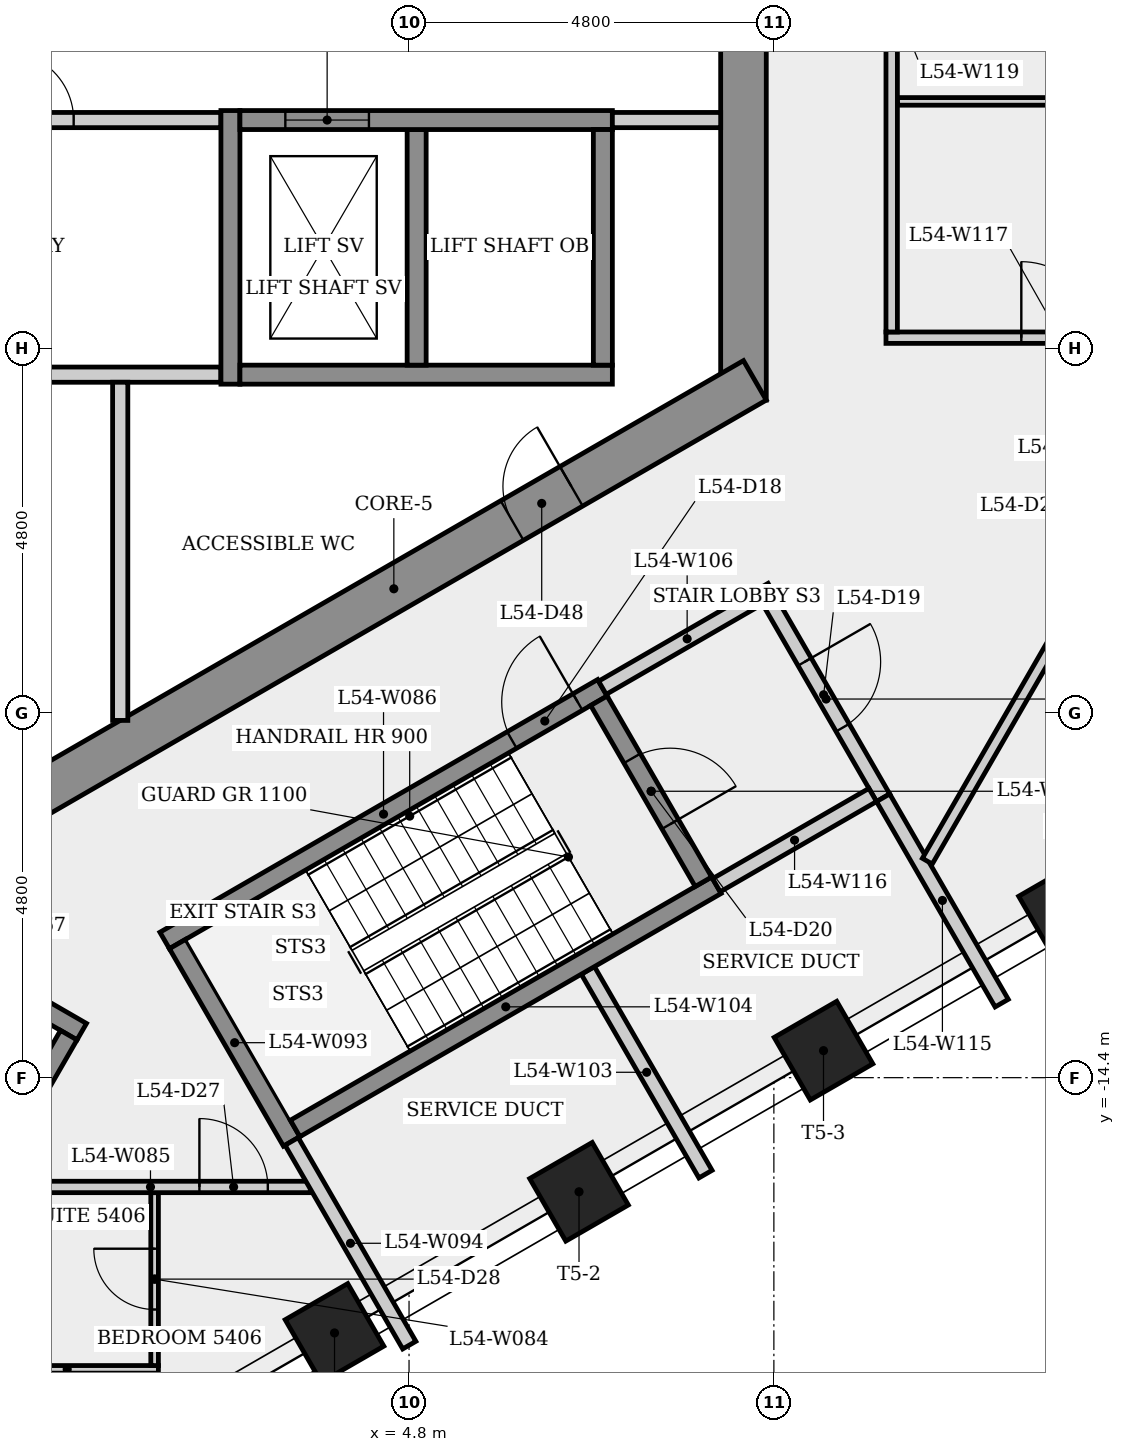
"""IFC4 building model, lengths in metres.
Left out: names, types, materials, properties, quantities, classifications, styles, units other than length and angle.
Written with IfcOpenShell. Run it as: python <this file> out.ifc"""

import sys

from ifc_helpers import new_model, si_unit, direction, frame, frame_2d, origin, origin_2d, place, context, subcontext, project, spatial, rectangle, extrude, element, fill, save


model = new_model("IFC4")
c1 = context("Model", 3, precision=1e-05, world=origin(), true_north=direction((0.0, 1.0)))
c2 = subcontext(c1, "Body", "Model", "MODEL_VIEW")
j1 = project(units=[si_unit("LENGTHUNIT", "METRE"), si_unit("PLANEANGLEUNIT", "RADIAN")], contexts=[c1])
p1 = place(None, origin())
s1 = spatial("IfcSite", under=j1, at=p1, CompositionType="ELEMENT")
p2 = place(p1, origin())
s2 = spatial("IfcBuilding", under=s1, at=p2, CompositionType="ELEMENT")
p3 = place(p2, frame((0.0, 0.0, 202.1)))
s3 = spatial("IfcBuildingStorey", under=s2, at=p3, CompositionType="ELEMENT", Elevation=202.1)
p4 = place(p3, frame((9.2, -5.485, 0.0), z_axis=(0.0, 0.0, 1.0), x_axis=(0.0, 1.0, 0.0)))
e1 = element("IfcWall", 1, at=p4, inside=s3, PredefinedType="SHEAR", context=c2, shape_type="SweptSolid", body=[
    extrude(rectangle(XDim=10.97, YDim=0.6, at=frame_2d((5.485, 0.0))), origin(), (0.0, 0.0, 1.0), 4.0),
])
p5 = place(p4, frame((4.685, 0.0, 0.0)))
e2 = element("IfcOpeningElement", 2, at=p5, cuts=e1, PredefinedType="OPENING", context=c2, shape_type="SweptSolid", body=[
    extrude(rectangle(XDim=1.6, YDim=2.1, at=frame_2d((0.8, 1.05))), frame((0.0, 0.31, 0.0), z_axis=(0.0, -1.0, 0.0), x_axis=(1.0, 0.0, 0.0)), (0.0, 0.0, 1.0), 0.62),
])
p6 = place(p3, frame((-9.35, -5.225, 0.0), z_axis=(0.0, 0.0, 1.0), x_axis=(0.866023993627, -0.500002442456, 0.0)))
e3 = element("IfcWall", 3, at=p6, inside=s3, PredefinedType="SHEAR", context=c2, shape_type="SweptSolid", body=[
    extrude(rectangle(XDim=10.97, YDim=0.6, at=frame_2d((5.485, 0.0))), origin(), (0.0, 0.0, 1.0), 4.0),
])
p7 = place(p6, frame((5.045, 0.0, 0.0)))
e4 = element("IfcOpeningElement", 4, at=p7, cuts=e3, PredefinedType="OPENING", context=c2, shape_type="SweptSolid", body=[
    extrude(rectangle(XDim=0.9, YDim=2.1, at=frame_2d((0.45, 1.05))), frame((0.0, 0.31, 0.0), z_axis=(0.0, -1.0, 0.0), x_axis=(1.0, 0.0, 0.0)), (0.0, 0.0, 1.0), 0.62),
])
p8 = place(p3, frame((-0.15, -10.71, 0.0), z_axis=(0.0, 0.0, 1.0), x_axis=(0.866023993627, 0.500002442456, 0.0)))
e5 = element("IfcWall", 5, at=p8, inside=s3, PredefinedType="SHEAR", context=c2, shape_type="SweptSolid", body=[
    extrude(rectangle(XDim=10.97, YDim=0.6, at=frame_2d((5.485, 0.0))), origin(), (0.0, 0.0, 1.0), 4.0),
])
p9 = place(p8, frame((7.281, 0.0, 0.0)))
e6 = element("IfcOpeningElement", 6, at=p9, cuts=e5, PredefinedType="OPENING", context=c2, shape_type="SweptSolid", body=[
    extrude(rectangle(XDim=0.9, YDim=2.1, at=frame_2d((0.45, 1.05))), frame((0.0, 0.31, 0.0), z_axis=(0.0, -1.0, 0.0), x_axis=(1.0, 0.0, 0.0)), (0.0, 0.0, 1.0), 0.62),
])
for number, where, z_axis, x_axis in (
    (7, (3.82, -17.759, 0.0), (0.0, 0.0, 1.0), (0.5, -0.866, 0.0)),
    (8, (7.036, -15.902, 0.0), (0.0, 0.0, 1.0), (0.5, -0.866, 0.0)),
    (9, (10.253, -14.044, 0.0), (0.0, 0.0, 1.0), (0.5, -0.866, 0.0)),
    (10, (13.47, -12.187, 0.0), (0.0, 0.0, 1.0), (0.5, -0.866, 0.0)),
):
    element("IfcColumn", number, at=place(p3, frame(where, z_axis=z_axis, x_axis=x_axis)), inside=s3, PredefinedType="COLUMN", context=c2, shape_type="SweptSolid", body=[
        extrude(rectangle(XDim=0.95, YDim=0.95, at=origin_2d()), origin(), (0.0, 0.0, 1.0), 4.0),
    ])
p10 = place(p3, frame((-8.88, -5.15, 0.0), z_axis=(0.0, 0.0, 1.0), x_axis=(1.0, 0.0, 0.0)))
e11 = element("IfcWall", 11, at=p10, inside=s3, PredefinedType="PARTITIONING", context=c2, shape_type="SweptSolid", body=[
    extrude(rectangle(XDim=11.205, YDim=0.2, at=frame_2d((5.603, 0.0))), origin(), (0.0, 0.0, 1.0), 3.6),
])
p11 = place(p3, frame((-8.9, -1.8, 0.0), z_axis=(0.0, 0.0, 1.0), x_axis=(1.0, 0.0, 0.0)))
e12 = element("IfcWall", 12, at=p11, inside=s3, PredefinedType="PARTITIONING", context=c2, shape_type="SweptSolid", body=[
    extrude(rectangle(XDim=11.225, YDim=0.2, at=frame_2d((5.613, 0.0))), origin(), (0.0, 0.0, 1.0), 3.6),
])
p12 = place(p11, frame((2.485, 0.0, 0.0)))
e13 = element("IfcOpeningElement", 13, at=p12, cuts=e12, PredefinedType="OPENING", context=c2, shape_type="SweptSolid", body=[
    extrude(rectangle(XDim=0.9, YDim=2.1, at=frame_2d((0.45, 1.05))), frame((0.0, 0.11, 0.0), z_axis=(0.0, -1.0, 0.0), x_axis=(1.0, 0.0, 0.0)), (0.0, 0.0, 1.0), 0.22),
])
p13 = place(p11, frame((8.387, 0.0, 0.0)))
e14 = element("IfcOpeningElement", 14, at=p13, cuts=e12, PredefinedType="OPENING", context=c2, shape_type="SweptSolid", body=[
    extrude(rectangle(XDim=0.9, YDim=2.1, at=frame_2d((0.45, 1.05))), frame((0.0, 0.11, 0.0), z_axis=(0.0, -1.0, 0.0), x_axis=(1.0, 0.0, 0.0)), (0.0, 0.0, 1.0), 0.22),
])
p14 = place(p3, frame((-2.364, -12.145, 0.0), z_axis=(0.0, 0.0, 1.0), x_axis=(0.866040211805, -0.499974350878, 0.0)))
e15 = element("IfcWall", 15, at=p14, inside=s3, PredefinedType="SHEAR", context=c2, shape_type="SweptSolid", body=[
    extrude(rectangle(XDim=3.3, YDim=0.25, at=frame_2d((1.65, 0.0))), origin(), (0.0, 0.0, 1.0), 3.6),
])
p15 = place(p3, frame((-0.898, -18.238, 0.0), z_axis=(0.0, 0.0, 1.0), x_axis=(1.0, 0.0, 0.0)))
e16 = element("IfcWall", 16, at=p15, inside=s3, PredefinedType="PARTITIONING", context=c2, shape_type="SweptSolid", body=[
    extrude(rectangle(XDim=2.4, YDim=0.1, at=frame_2d((1.2, 0.0))), origin(), (0.0, 0.0, 1.0), 3.6),
])
p16 = place(p3, frame((0.323, -13.841, 0.0), z_axis=(0.0, 0.0, 1.0), x_axis=(-0.500086702647, -0.865975340201, 0.0)))
e17 = element("IfcWall", 17, at=p16, inside=s3, PredefinedType="SHEAR", context=c2, shape_type="SweptSolid", body=[
    extrude(rectangle(XDim=2.301, YDim=0.25, at=frame_2d((1.151, 0.0))), origin(), (0.0, 0.0, 1.0), 4.0),
])
p17 = place(p3, frame((1.0, -5.25, 0.0), z_axis=(0.0, 0.0, 1.0), x_axis=(0.0, -1.0, 0.0)))
e18 = element("IfcWall", 18, at=p17, inside=s3, PredefinedType="PARTITIONING", context=c2, shape_type="SweptSolid", body=[
    extrude(rectangle(XDim=4.449, YDim=0.2, at=frame_2d((2.225, 0.0))), origin(), (0.0, 0.0, 1.0), 3.6),
])
p18 = place(p3, frame((1.452, -18.188, 0.0), z_axis=(0.0, 0.0, 1.0), x_axis=(0.0, 1.0, 0.0)))
e19 = element("IfcWall", 19, at=p18, inside=s3, PredefinedType="PARTITIONING", context=c2, shape_type="SweptSolid", body=[
    extrude(rectangle(XDim=2.275, YDim=0.1, at=frame_2d((1.137, 0.0))), origin(), (0.0, 0.0, 1.0), 3.6),
])
p19 = place(p18, frame((0.738, 0.0, 0.0)))
e20 = element("IfcOpeningElement", 20, at=p19, cuts=e19, PredefinedType="OPENING", context=c2, shape_type="SweptSolid", body=[
    extrude(rectangle(XDim=0.8, YDim=2.1, at=frame_2d((0.4, 1.05))), frame((0.0, 0.06, 0.0), z_axis=(0.0, -1.0, 0.0), x_axis=(1.0, 0.0, 0.0)), (0.0, 0.0, 1.0), 0.12),
])
p20 = place(p3, frame((-0.705, -15.838, 0.0), z_axis=(0.0, 0.0, 1.0), x_axis=(1.0, 0.0, 0.0)))
e21 = element("IfcWall", 21, at=p20, inside=s3, PredefinedType="PARTITIONING", context=c2, shape_type="SweptSolid", body=[
    extrude(rectangle(XDim=4.207, YDim=0.15, at=frame_2d((2.104, 0.0))), origin(), (0.0, 0.0, 1.0), 3.6),
])
p21 = place(p20, frame((2.747, 0.0, 0.0)))
e22 = element("IfcOpeningElement", 22, at=p21, cuts=e21, PredefinedType="OPENING", context=c2, shape_type="SweptSolid", body=[
    extrude(rectangle(XDim=0.9, YDim=2.1, at=frame_2d((0.45, 1.05))), frame((0.0, 0.085, 0.0), z_axis=(0.0, -1.0, 0.0), x_axis=(1.0, 0.0, 0.0)), (0.0, 0.0, 1.0), 0.17),
])
p22 = place(p3, frame((1.585, -12.595, 0.0), z_axis=(0.0, 0.0, 1.0), x_axis=(0.866036417653, 0.499980922934, 0.0)))
e23 = element("IfcWall", 23, at=p22, inside=s3, PredefinedType="SHEAR", context=c2, shape_type="SweptSolid", body=[
    extrude(rectangle(XDim=6.65, YDim=0.25, at=frame_2d((3.325, 0.0))), origin(), (0.0, 0.0, 1.0), 3.6),
])
p23 = place(p22, frame((5.275, 0.0, 0.0)))
e24 = element("IfcOpeningElement", 24, at=p23, cuts=e23, PredefinedType="OPENING", context=c2, shape_type="SweptSolid", body=[
    extrude(rectangle(XDim=1.0, YDim=2.1, at=frame_2d((0.5, 1.05))), frame((0.0, 0.135, 0.0), z_axis=(0.0, -1.0, 0.0), x_axis=(1.0, 0.0, 0.0)), (0.0, 0.0, 1.0), 0.27),
])
p24 = place(p3, frame((2.45, -5.275, 0.0), z_axis=(0.0, 0.0, 1.0), x_axis=(0.0, 1.0, 0.0)))
e25 = element("IfcWall", 25, at=p24, inside=s3, PredefinedType="SHEAR", context=c2, shape_type="SweptSolid", body=[
    extrude(rectangle(XDim=3.6, YDim=0.25, at=frame_2d((1.8, 0.0))), origin(), (0.0, 0.0, 1.0), 3.6),
])
p25 = place(p3, frame((3.256, -15.239, 0.0), z_axis=(0.0, 0.0, 1.0), x_axis=(-0.50002537861, 0.866010750942, 0.0)))
e26 = element("IfcWall", 26, at=p25, inside=s3, PredefinedType="SHEAR", context=c2, shape_type="SweptSolid", body=[
    extrude(rectangle(XDim=3.0, YDim=0.25, at=frame_2d((1.5, 0.0))), origin(), (0.0, 0.0, 1.0), 3.6),
])
p26 = place(p3, frame((3.256, -15.239, 0.0), z_axis=(0.0, 0.0, 1.0), x_axis=(0.499981900942, -0.866035853028, 0.0)))
e27 = element("IfcWall", 27, at=p26, inside=s3, PredefinedType="PLUMBINGWALL", context=c2, shape_type="SweptSolid", body=[
    extrude(rectangle(XDim=3.095, YDim=0.2, at=frame_2d((1.548, 0.0))), origin(), (0.0, 0.0, 1.0), 3.6),
])
p27 = place(p3, frame((2.575, -5.15, 0.0), z_axis=(0.0, 0.0, 1.0), x_axis=(1.0, 0.0, 0.0)))
e28 = element("IfcWall", 28, at=p27, inside=s3, PredefinedType="SHEAR", context=c2, shape_type="SweptSolid", body=[
    extrude(rectangle(XDim=4.9, YDim=0.25, at=frame_2d((2.45, 0.0))), origin(), (0.0, 0.0, 1.0), 3.6),
])
p28 = place(p3, frame((4.9, -1.925, 0.0), z_axis=(0.0, 0.0, 1.0), x_axis=(0.0, -1.0, 0.0)))
e29 = element("IfcWall", 29, at=p28, inside=s3, PredefinedType="SHEAR", context=c2, shape_type="SweptSolid", body=[
    extrude(rectangle(XDim=3.1, YDim=0.25, at=frame_2d((1.55, 0.0))), origin(), (0.0, 0.0, 1.0), 4.0),
])
p29 = place(p3, frame((2.575, -1.8, 0.0), z_axis=(0.0, 0.0, 1.0), x_axis=(1.0, 0.0, 0.0)))
e30 = element("IfcWall", 30, at=p29, inside=s3, PredefinedType="SHEAR", context=c2, shape_type="SweptSolid", body=[
    extrude(rectangle(XDim=4.9, YDim=0.25, at=frame_2d((2.45, 0.0))), origin(), (0.0, 0.0, 1.0), 3.6),
])
p30 = place(p29, frame((0.597, 0.0, 0.0)))
e31 = element("IfcOpeningElement", 31, at=p30, cuts=e30, PredefinedType="OPENING", context=c2, shape_type="SweptSolid", body=[
    extrude(rectangle(XDim=1.1, YDim=2.1, at=frame_2d((0.55, 1.05))), frame((0.0, 0.135, 0.0), z_axis=(0.0, -1.0, 0.0), x_axis=(1.0, 0.0, 0.0)), (0.0, 0.0, 1.0), 0.27),
])
p31 = place(p3, frame((7.153, -12.989, 0.0), z_axis=(0.0, 0.0, 1.0), x_axis=(0.499981900942, -0.866035853028, 0.0)))
e32 = element("IfcWall", 32, at=p31, inside=s3, PredefinedType="PLUMBINGWALL", context=c2, shape_type="SweptSolid", body=[
    extrude(rectangle(XDim=3.095, YDim=0.2, at=frame_2d((1.548, 0.0))), origin(), (0.0, 0.0, 1.0), 3.6),
])
p32 = place(p3, frame((3.301, -15.068, 0.0), z_axis=(0.0, 0.0, 1.0), x_axis=(0.866035036182, 0.499983315828, 0.0)))
e33 = element("IfcWall", 33, at=p32, inside=s3, PredefinedType="SHEAR", context=c2, shape_type="SweptSolid", body=[
    extrude(rectangle(XDim=6.4, YDim=0.25, at=frame_2d((3.2, 0.0))), origin(), (0.0, 0.0, 1.0), 4.0),
])
p33 = place(p3, frame((7.298, -9.441, 0.0), z_axis=(0.0, 0.0, 1.0), x_axis=(0.500034990121, -0.866005201286, 0.0)))
e34 = element("IfcWall", 34, at=p33, inside=s3, PredefinedType="SHEAR", context=c2, shape_type="SweptSolid", body=[
    extrude(rectangle(XDim=2.75, YDim=0.25, at=frame_2d((1.375, 0.0))), origin(), (0.0, 0.0, 1.0), 3.6),
])
p34 = place(p33, frame((0.875, 0.0, 0.0)))
e35 = element("IfcOpeningElement", 35, at=p34, cuts=e34, PredefinedType="OPENING", context=c2, shape_type="SweptSolid", body=[
    extrude(rectangle(XDim=1.0, YDim=2.1, at=frame_2d((0.5, 1.05))), frame((0.0, 0.135, 0.0), z_axis=(0.0, -1.0, 0.0), x_axis=(1.0, 0.0, 0.0)), (0.0, 0.0, 1.0), 0.27),
])
p35 = place(p3, frame((7.344, -9.27, 0.0), z_axis=(0.0, 0.0, 1.0), x_axis=(0.866005588531, 0.500034319456, 0.0)))
e36 = element("IfcWall", 36, at=p35, inside=s3, PredefinedType="PARTITIONING", context=c2, shape_type="SweptSolid", body=[
    extrude(rectangle(XDim=2.575, YDim=0.2, at=frame_2d((1.288, 0.0))), origin(), (0.0, 0.0, 1.0), 3.6),
])
p36 = place(p3, frame((7.35, -1.925, 0.0), z_axis=(0.0, 0.0, 1.0), x_axis=(0.0, -1.0, 0.0)))
e37 = element("IfcWall", 37, at=p36, inside=s3, PredefinedType="SHEAR", context=c2, shape_type="SweptSolid", body=[
    extrude(rectangle(XDim=3.1, YDim=0.25, at=frame_2d((1.55, 0.0))), origin(), (0.0, 0.0, 1.0), 4.0),
])
p37 = place(p3, frame((8.9, -1.8, 0.0), z_axis=(0.0, 0.0, 1.0), x_axis=(-1.0, 0.0, 0.0)))
e38 = element("IfcWall", 38, at=p37, inside=s3, PredefinedType="PARTITIONING", context=c2, shape_type="SweptSolid", body=[
    extrude(rectangle(XDim=1.425, YDim=0.2, at=frame_2d((0.712, 0.0))), origin(), (0.0, 0.0, 1.0), 3.6),
])
p38 = place(p3, frame((9.537, -8.119, 0.0), z_axis=(0.0, 0.0, 1.0), x_axis=(0.499990139034, -0.866031096941, 0.0)))
e39 = element("IfcWall", 39, at=p38, inside=s3, PredefinedType="PARTITIONING", context=c2, shape_type="SweptSolid", body=[
    extrude(rectangle(XDim=3.0, YDim=0.2, at=frame_2d((1.5, 0.0))), origin(), (0.0, 0.0, 1.0), 3.6),
])
p39 = place(p38, frame((0.935, 0.0, 0.0)))
e40 = element("IfcOpeningElement", 40, at=p39, cuts=e39, PredefinedType="OPENING", context=c2, shape_type="SweptSolid", body=[
    extrude(rectangle(XDim=1.0, YDim=2.1, at=frame_2d((0.5, 1.05))), frame((0.0, 0.11, 0.0), z_axis=(0.0, -1.0, 0.0), x_axis=(1.0, 0.0, 0.0)), (0.0, 0.0, 1.0), 0.22),
])
p40 = place(p3, frame((11.037, -10.717, 0.0), z_axis=(0.0, 0.0, 1.0), x_axis=(0.499993381564, -0.866029224906, 0.0)))
e41 = element("IfcWall", 41, at=p40, inside=s3, PredefinedType="PLUMBINGWALL", context=c2, shape_type="SweptSolid", body=[
    extrude(rectangle(XDim=3.12, YDim=0.2, at=frame_2d((1.56, 0.0))), origin(), (0.0, 0.0, 1.0), 3.6),
])
p41 = place(p3, frame((10.901, -10.681, 0.0), z_axis=(0.0, 0.0, 1.0), x_axis=(-0.866007538022, -0.500030943131, 0.0)))
e42 = element("IfcWall", 42, at=p41, inside=s3, PredefinedType="PLUMBINGWALL", context=c2, shape_type="SweptSolid", body=[
    extrude(rectangle(XDim=2.375, YDim=0.2, at=frame_2d((1.188, 0.0))), origin(), (0.0, 0.0, 1.0), 3.6),
])
p42 = place(p3, frame((11.075, -4.663, 0.0), z_axis=(0.0, 0.0, 1.0), x_axis=(1.0, 0.0, 0.0)))
e43 = element("IfcWall", 43, at=p42, inside=s3, PredefinedType="PARTITIONING", context=c2, shape_type="SweptSolid", body=[
    extrude(rectangle(XDim=4.596, YDim=0.15, at=frame_2d((2.298, 0.0))), origin(), (0.0, 0.0, 1.0), 3.6),
])
p43 = place(p42, frame((1.781, 0.0, 0.0)))
e44 = element("IfcOpeningElement", 44, at=p43, cuts=e43, PredefinedType="OPENING", context=c2, shape_type="SweptSolid", body=[
    extrude(rectangle(XDim=1.0, YDim=2.1, at=frame_2d((0.5, 1.05))), frame((0.0, 0.085, 0.0), z_axis=(0.0, -1.0, 0.0), x_axis=(1.0, 0.0, 0.0)), (0.0, 0.0, 1.0), 0.17),
])
p44 = place(p3, frame((11.225, -1.554, 0.0), z_axis=(0.0, 0.0, 1.0), x_axis=(1.0, 0.0, 0.0)))
e45 = element("IfcWall", 45, at=p44, inside=s3, PredefinedType="PARTITIONING", context=c2, shape_type="SweptSolid", body=[
    extrude(rectangle(XDim=6.961, YDim=0.1, at=frame_2d((3.481, 0.0))), origin(), (0.0, 0.0, 1.0), 3.6),
])
p45 = place(p3, frame((11.15, -4.588, 0.0), z_axis=(0.0, 0.0, 1.0), x_axis=(0.0, 1.0, 0.0)))
e46 = element("IfcWall", 46, at=p45, inside=s3, PredefinedType="PARTITIONING", context=c2, shape_type="SweptSolid", body=[
    extrude(rectangle(XDim=8.877, YDim=0.15, at=frame_2d((4.438, 0.0))), origin(), (0.0, 0.0, 1.0), 3.6),
])
p46 = place(p45, frame((4.088, 0.0, 0.0)))
e47 = element("IfcOpeningElement", 47, at=p46, cuts=e46, PredefinedType="OPENING", context=c2, shape_type="SweptSolid", body=[
    extrude(rectangle(XDim=1.0, YDim=2.1, at=frame_2d((0.5, 1.05))), frame((0.0, 0.085, 0.0), z_axis=(0.0, -1.0, 0.0), x_axis=(1.0, 0.0, 0.0)), (0.0, 0.0, 1.0), 0.17),
])
p47 = place(p3, frame((15.558, -4.728, 0.0), z_axis=(0.0, 0.0, 1.0), x_axis=(-0.500004989119, -0.866022523296, 0.0)))
e48 = element("IfcWall", 48, at=p47, inside=s3, PredefinedType="PARTITIONING", context=c2, shape_type="SweptSolid", body=[
    extrude(rectangle(XDim=7.879, YDim=0.15, at=frame_2d((3.939, 0.0))), origin(), (0.0, 0.0, 1.0), 3.6),
])
p48 = place(p47, frame((3.439, 0.0, 0.0)))
e49 = element("IfcOpeningElement", 49, at=p48, cuts=e48, PredefinedType="OPENING", context=c2, shape_type="SweptSolid", body=[
    extrude(rectangle(XDim=1.0, YDim=2.1, at=frame_2d((0.5, 1.05))), frame((0.0, 0.085, 0.0), z_axis=(0.0, -1.0, 0.0), x_axis=(1.0, 0.0, 0.0)), (0.0, 0.0, 1.0), 0.17),
])
p49 = place(p30, origin())
e50 = element("IfcDoor", 50, at=p49, inside=s3, OperationType="SLIDING_TO_LEFT", PredefinedType="DOOR", context=c2, shape_type="SweptSolid", body=[
    extrude(rectangle(XDim=1.1, YDim=2.1, at=frame_2d((0.55, 1.05))), frame((0.0, 0.025, 0.0), z_axis=(0.0, -1.0, 0.0), x_axis=(1.0, 0.0, 0.0)), (0.0, 0.0, 1.0), 0.05),
])
fill(e31, e50)
p50 = place(p13, origin())
e51 = element("IfcDoor", 51, at=p50, inside=s3, OperationType="SINGLE_SWING_LEFT", PredefinedType="DOOR", context=c2, shape_type="SweptSolid", body=[
    extrude(rectangle(XDim=0.9, YDim=2.1, at=frame_2d((0.45, 1.05))), frame((0.0, 0.025, 0.0), z_axis=(0.0, -1.0, 0.0), x_axis=(1.0, 0.0, 0.0)), (0.0, 0.0, 1.0), 0.05),
])
fill(e14, e51)
p51 = place(p23, origin())
e52 = element("IfcDoor", 52, at=p51, inside=s3, OperationType="SINGLE_SWING_RIGHT", PredefinedType="DOOR", context=c2, shape_type="SweptSolid", body=[
    extrude(rectangle(XDim=1.0, YDim=2.1, at=frame_2d((0.5, 1.05))), frame((0.0, 0.025, 0.0), z_axis=(0.0, -1.0, 0.0), x_axis=(1.0, 0.0, 0.0)), (0.0, 0.0, 1.0), 0.05),
])
fill(e24, e52)
p52 = place(p39, origin())
e53 = element("IfcDoor", 53, at=p52, inside=s3, OperationType="SINGLE_SWING_LEFT", PredefinedType="DOOR", context=c2, shape_type="SweptSolid", body=[
    extrude(rectangle(XDim=1.0, YDim=2.1, at=frame_2d((0.5, 1.05))), frame((0.0, 0.025, 0.0), z_axis=(0.0, -1.0, 0.0), x_axis=(1.0, 0.0, 0.0)), (0.0, 0.0, 1.0), 0.05),
])
fill(e40, e53)
p53 = place(p34, origin())
e54 = element("IfcDoor", 54, at=p53, inside=s3, OperationType="SINGLE_SWING_RIGHT", PredefinedType="DOOR", context=c2, shape_type="SweptSolid", body=[
    extrude(rectangle(XDim=1.0, YDim=2.1, at=frame_2d((0.5, 1.05))), frame((0.0, 0.025, 0.0), z_axis=(0.0, -1.0, 0.0), x_axis=(1.0, 0.0, 0.0)), (0.0, 0.0, 1.0), 0.05),
])
fill(e35, e54)
p54 = place(p43, origin())
e55 = element("IfcDoor", 55, at=p54, inside=s3, OperationType="SINGLE_SWING_LEFT", PredefinedType="DOOR", context=c2, shape_type="SweptSolid", body=[
    extrude(rectangle(XDim=1.0, YDim=2.1, at=frame_2d((0.5, 1.05))), frame((0.0, 0.025, 0.0), z_axis=(0.0, -1.0, 0.0), x_axis=(1.0, 0.0, 0.0)), (0.0, 0.0, 1.0), 0.05),
])
fill(e44, e55)
p55 = place(p21, origin())
e56 = element("IfcDoor", 56, at=p55, inside=s3, OperationType="SINGLE_SWING_LEFT", PredefinedType="DOOR", context=c2, shape_type="SweptSolid", body=[
    extrude(rectangle(XDim=0.9, YDim=2.1, at=frame_2d((0.45, 1.05))), frame((0.0, 0.025, 0.0), z_axis=(0.0, -1.0, 0.0), x_axis=(1.0, 0.0, 0.0)), (0.0, 0.0, 1.0), 0.05),
])
fill(e22, e56)
p56 = place(p19, origin())
e57 = element("IfcDoor", 57, at=p56, inside=s3, OperationType="SINGLE_SWING_RIGHT", PredefinedType="DOOR", context=c2, shape_type="SweptSolid", body=[
    extrude(rectangle(XDim=0.8, YDim=2.1, at=frame_2d((0.4, 1.05))), frame((0.0, 0.025, 0.0), z_axis=(0.0, -1.0, 0.0), x_axis=(1.0, 0.0, 0.0)), (0.0, 0.0, 1.0), 0.05),
])
fill(e20, e57)
p57 = place(p9, origin())
e58 = element("IfcDoor", 58, at=p57, inside=s3, OperationType="SINGLE_SWING_RIGHT", PredefinedType="DOOR", context=c2, shape_type="SweptSolid", body=[
    extrude(rectangle(XDim=0.9, YDim=2.1, at=frame_2d((0.45, 1.05))), frame((0.0, 0.025, 0.0), z_axis=(0.0, -1.0, 0.0), x_axis=(1.0, 0.0, 0.0)), (0.0, 0.0, 1.0), 0.05),
])
fill(e6, e58)
save(model, sys.argv[1])
